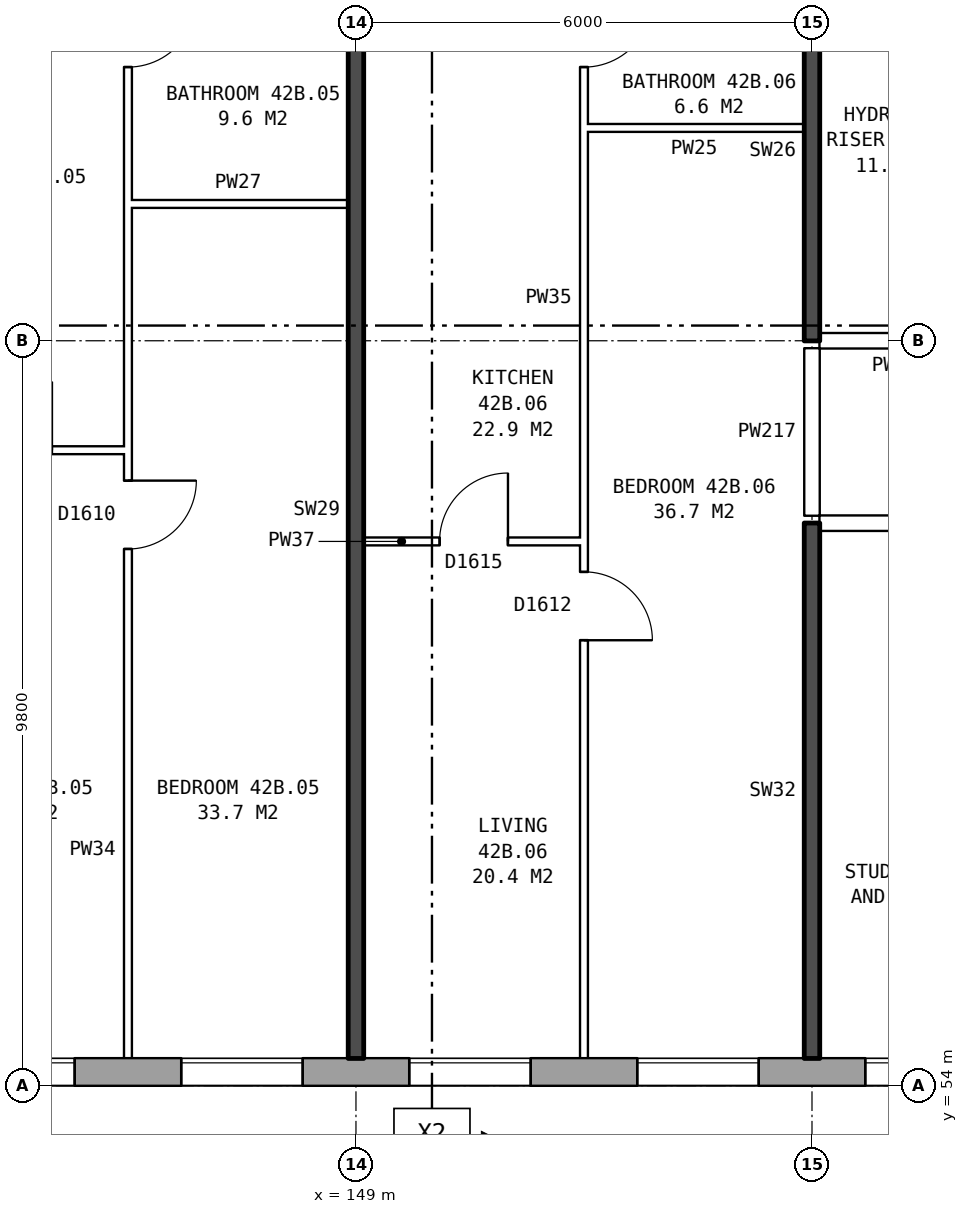
"""IFC4 building model, lengths in metres.
Left out: names, types, materials, properties, quantities, classifications, styles, units other than length and angle.
Written with IfcOpenShell. Run it as: python <this file> out.ifc"""

import sys

from ifc_helpers import new_model, si_unit, direction, frame, frame_2d, origin, place, context, subcontext, project, spatial, rectangle, extrude, element, fill, save


model = new_model("IFC4")
c1 = context("Model", 3, precision=1e-05, world=origin(), true_north=direction((0.0, 1.0)))
c2 = subcontext(c1, "Body", "Model", "MODEL_VIEW")
j1 = project(units=[si_unit("LENGTHUNIT", "METRE"), si_unit("PLANEANGLEUNIT", "RADIAN")], contexts=[c1])
p1 = place(None, origin())
s1 = spatial("IfcSite", under=j1, at=p1, CompositionType="ELEMENT")
p2 = place(p1, origin())
s2 = spatial("IfcBuilding", under=s1, at=p2, CompositionType="ELEMENT")
p3 = place(p2, frame((0.0, 0.0, 151.6)))
s3 = spatial("IfcBuildingStorey", under=s2, at=p3, CompositionType="ELEMENT", Elevation=151.6)
p4 = place(p3, frame((134.075, 54.18, 0.0), z_axis=(0.0, 0.0, 1.0), x_axis=(1.0, 0.0, 0.0)))
e1 = element("IfcWall", 1, at=p4, inside=s3, PredefinedType="STANDARD", context=c2, shape_type="SweptSolid", body=[
    extrude(rectangle(XDim=34.351, YDim=0.36, at=frame_2d((17.175, 0.0))), origin(), (0.0, 0.0, 1.0), 2.85),
])
p5 = place(p4, frame((0.3, 0.0, 0.8)))
e2 = element("IfcOpeningElement", 2, at=p5, cuts=e1, PredefinedType="OPENING", context=c2, shape_type="SweptSolid", body=[
    extrude(rectangle(XDim=0.8, YDim=1.8, at=frame_2d((0.4, 0.9))), frame((0.0, 0.19, 0.0), z_axis=(0.0, -1.0, 0.0), x_axis=(1.0, 0.0, 0.0)), (0.0, 0.0, 1.0), 0.38),
])
p6 = place(p4, frame((3.575, 0.0, 0.8)))
e3 = element("IfcOpeningElement", 3, at=p6, cuts=e1, PredefinedType="OPENING", context=c2, shape_type="SweptSolid", body=[
    extrude(rectangle(XDim=1.0, YDim=1.2, at=frame_2d((0.5, 0.6))), frame((0.0, 0.19, 0.0), z_axis=(0.0, -1.0, 0.0), x_axis=(1.0, 0.0, 0.0)), (0.0, 0.0, 1.0), 0.38),
])
p7 = place(p4, frame((6.625, 0.0, 0.8)))
e4 = element("IfcOpeningElement", 4, at=p7, cuts=e1, PredefinedType="OPENING", context=c2, shape_type="SweptSolid", body=[
    extrude(rectangle(XDim=1.6, YDim=1.8, at=frame_2d((0.8, 0.9))), frame((0.0, 0.19, 0.0), z_axis=(0.0, -1.0, 0.0), x_axis=(1.0, 0.0, 0.0)), (0.0, 0.0, 1.0), 0.38),
])
p8 = place(p4, frame((9.625, 0.0, 0.8)))
e5 = element("IfcOpeningElement", 5, at=p8, cuts=e1, PredefinedType="OPENING", context=c2, shape_type="SweptSolid", body=[
    extrude(rectangle(XDim=1.6, YDim=1.8, at=frame_2d((0.8, 0.9))), frame((0.0, 0.19, 0.0), z_axis=(0.0, -1.0, 0.0), x_axis=(1.0, 0.0, 0.0)), (0.0, 0.0, 1.0), 0.38),
])
p9 = place(p4, frame((12.625, 0.0, 0.8)))
e6 = element("IfcOpeningElement", 6, at=p9, cuts=e1, PredefinedType="OPENING", context=c2, shape_type="SweptSolid", body=[
    extrude(rectangle(XDim=1.6, YDim=1.8, at=frame_2d((0.8, 0.9))), frame((0.0, 0.19, 0.0), z_axis=(0.0, -1.0, 0.0), x_axis=(1.0, 0.0, 0.0)), (0.0, 0.0, 1.0), 0.38),
])
p10 = place(p4, frame((15.625, 0.0, 0.8)))
e7 = element("IfcOpeningElement", 7, at=p10, cuts=e1, PredefinedType="OPENING", context=c2, shape_type="SweptSolid", body=[
    extrude(rectangle(XDim=1.6, YDim=1.8, at=frame_2d((0.8, 0.9))), frame((0.0, 0.19, 0.0), z_axis=(0.0, -1.0, 0.0), x_axis=(1.0, 0.0, 0.0)), (0.0, 0.0, 1.0), 0.38),
])
p11 = place(p4, frame((18.625, 0.0, 0.8)))
e8 = element("IfcOpeningElement", 8, at=p11, cuts=e1, PredefinedType="OPENING", context=c2, shape_type="SweptSolid", body=[
    extrude(rectangle(XDim=1.6, YDim=1.8, at=frame_2d((0.8, 0.9))), frame((0.0, 0.19, 0.0), z_axis=(0.0, -1.0, 0.0), x_axis=(1.0, 0.0, 0.0)), (0.0, 0.0, 1.0), 0.38),
])
p12 = place(p4, frame((21.625, 0.0, 0.8)))
e9 = element("IfcOpeningElement", 9, at=p12, cuts=e1, PredefinedType="OPENING", context=c2, shape_type="SweptSolid", body=[
    extrude(rectangle(XDim=1.6, YDim=1.8, at=frame_2d((0.8, 0.9))), frame((0.0, 0.19, 0.0), z_axis=(0.0, -1.0, 0.0), x_axis=(1.0, 0.0, 0.0)), (0.0, 0.0, 1.0), 0.38),
])
p13 = place(p4, frame((24.625, 0.0, 0.8)))
e10 = element("IfcOpeningElement", 10, at=p13, cuts=e1, PredefinedType="OPENING", context=c2, shape_type="SweptSolid", body=[
    extrude(rectangle(XDim=1.6, YDim=1.8, at=frame_2d((0.8, 0.9))), frame((0.0, 0.19, 0.0), z_axis=(0.0, -1.0, 0.0), x_axis=(1.0, 0.0, 0.0)), (0.0, 0.0, 1.0), 0.38),
])
p14 = place(p4, frame((27.625, 0.0, 0.8)))
e11 = element("IfcOpeningElement", 11, at=p14, cuts=e1, PredefinedType="OPENING", context=c2, shape_type="SweptSolid", body=[
    extrude(rectangle(XDim=1.6, YDim=1.8, at=frame_2d((0.8, 0.9))), frame((0.0, 0.19, 0.0), z_axis=(0.0, -1.0, 0.0), x_axis=(1.0, 0.0, 0.0)), (0.0, 0.0, 1.0), 0.38),
])
p15 = place(p4, frame((29.525, 0.0, 0.8)))
e12 = element("IfcOpeningElement", 12, at=p15, cuts=e1, PredefinedType="OPENING", context=c2, shape_type="SweptSolid", body=[
    extrude(rectangle(XDim=0.6, YDim=1.8, at=frame_2d((0.3, 0.9))), frame((0.0, 0.19, 0.0), z_axis=(0.0, -1.0, 0.0), x_axis=(1.0, 0.0, 0.0)), (0.0, 0.0, 1.0), 0.38),
])
p16 = place(p4, frame((1.4, 0.0, 1.6)))
e13 = element("IfcOpeningElement", 13, at=p16, cuts=e1, PredefinedType="OPENING", context=c2, shape_type="SweptSolid", body=[
    extrude(rectangle(XDim=0.6, YDim=0.9, at=frame_2d((0.3, 0.45))), frame((0.0, 0.19, 0.0), z_axis=(0.0, -1.0, 0.0), x_axis=(1.0, 0.0, 0.0)), (0.0, 0.0, 1.0), 0.38),
])
p17 = place(p4, frame((4.875, 0.0, 0.8)))
e14 = element("IfcOpeningElement", 14, at=p17, cuts=e1, PredefinedType="OPENING", context=c2, shape_type="SweptSolid", body=[
    extrude(rectangle(XDim=1.4, YDim=1.8, at=frame_2d((0.7, 0.9))), frame((0.0, 0.19, 0.0), z_axis=(0.0, -1.0, 0.0), x_axis=(1.0, 0.0, 0.0)), (0.0, 0.0, 1.0), 0.38),
])
p18 = place(p4, frame((30.425, 0.0, 0.8)))
e15 = element("IfcOpeningElement", 15, at=p18, cuts=e1, PredefinedType="OPENING", context=c2, shape_type="SweptSolid", body=[
    extrude(rectangle(XDim=0.6, YDim=0.9, at=frame_2d((0.3, 0.45))), frame((0.0, 0.19, 0.0), z_axis=(0.0, -1.0, 0.0), x_axis=(1.0, 0.0, 0.0)), (0.0, 0.0, 1.0), 0.38),
])
p19 = place(p3, frame((149.1, 61.16, 0.0), z_axis=(0.0, 0.0, 1.0), x_axis=(1.0, 0.0, 0.0)))
e16 = element("IfcWall", 16, at=p19, inside=s3, PredefinedType="PARTITIONING", context=c2, shape_type="SweptSolid", body=[
    extrude(rectangle(XDim=2.9, YDim=0.1, at=frame_2d((1.45, 0.0))), origin(), (0.0, 0.0, 1.0), 2.85),
])
p20 = place(p19, frame((1.0, 0.0, 0.0)))
e17 = element("IfcOpeningElement", 17, at=p20, cuts=e16, PredefinedType="OPENING", context=c2, shape_type="SweptSolid", body=[
    extrude(rectangle(XDim=0.9, YDim=2.1, at=frame_2d((0.45, 1.05))), frame((0.0, 0.06, 0.0), z_axis=(0.0, -1.0, 0.0), x_axis=(1.0, 0.0, 0.0)), (0.0, 0.0, 1.0), 0.12),
])
p21 = place(p3, frame((155.1, 61.4, 0.0), z_axis=(0.0, 0.0, 1.0), x_axis=(1.0, 0.0, 0.0)))
e18 = element("IfcWall", 18, at=p21, inside=s3, PredefinedType="PARTITIONING", context=c2, shape_type="SweptSolid", body=[
    extrude(rectangle(XDim=16.04, YDim=0.2, at=frame_2d((8.02, 0.0))), origin(), (0.0, 0.0, 1.0), 2.85),
])
p22 = place(p21, frame((1.45, 0.0, 0.0)))
e19 = element("IfcOpeningElement", 19, at=p22, cuts=e18, PredefinedType="OPENING", context=c2, shape_type="SweptSolid", body=[
    extrude(rectangle(XDim=1.0, YDim=2.1, at=frame_2d((0.5, 1.05))), frame((0.0, 0.11, 0.0), z_axis=(0.0, -1.0, 0.0), x_axis=(1.0, 0.0, 0.0)), (0.0, 0.0, 1.0), 0.22),
])
p23 = place(p21, frame((8.4, 0.0, 0.0)))
e20 = element("IfcOpeningElement", 20, at=p23, cuts=e18, PredefinedType="OPENING", context=c2, shape_type="SweptSolid", body=[
    extrude(rectangle(XDim=1.0, YDim=2.1, at=frame_2d((0.5, 1.05))), frame((0.0, 0.11, 0.0), z_axis=(0.0, -1.0, 0.0), x_axis=(1.0, 0.0, 0.0)), (0.0, 0.0, 1.0), 0.22),
])
p24 = place(p3, frame((143.1, 62.36, 0.0), z_axis=(0.0, 0.0, 1.0), x_axis=(1.0, 0.0, 0.0)))
e21 = element("IfcWall", 21, at=p24, inside=s3, PredefinedType="PARTITIONING", context=c2, shape_type="SweptSolid", body=[
    extrude(rectangle(XDim=2.9, YDim=0.1, at=frame_2d((1.45, 0.0))), origin(), (0.0, 0.0, 1.0), 2.85),
])
p25 = place(p24, frame((1.0, 0.0, 0.0)))
e22 = element("IfcOpeningElement", 22, at=p25, cuts=e21, PredefinedType="OPENING", context=c2, shape_type="SweptSolid", body=[
    extrude(rectangle(XDim=0.9, YDim=2.1, at=frame_2d((0.45, 1.05))), frame((0.0, 0.06, 0.0), z_axis=(0.0, -1.0, 0.0), x_axis=(1.0, 0.0, 0.0)), (0.0, 0.0, 1.0), 0.12),
])
p26 = place(p3, frame((155.1, 63.8, 0.0), z_axis=(0.0, 0.0, 1.0), x_axis=(1.0, 0.0, 0.0)))
e23 = element("IfcWall", 23, at=p26, inside=s3, PredefinedType="PARTITIONING", context=c2, shape_type="SweptSolid", body=[
    extrude(rectangle(XDim=2.14, YDim=0.2, at=frame_2d((1.07, 0.0))), origin(), (0.0, 0.0, 1.0), 2.85),
])
for number, where, z_axis, x_axis in (
    (24, (146.0, 65.6, 0.0), (0.0, 0.0, 1.0), (1.0, 0.0, 0.0)),
    (25, (152.0, 66.6, 0.0), (0.0, 0.0, 1.0), (1.0, 0.0, 0.0)),
):
    element("IfcWall", number, at=place(p3, frame(where, z_axis=z_axis, x_axis=x_axis)), inside=s3, PredefinedType="PARTITIONING", context=c2, shape_type="SweptSolid", body=[
        extrude(rectangle(XDim=2.9, YDim=0.1, at=frame_2d((1.45, 0.0))), origin(), (0.0, 0.0, 1.0), 2.85),
    ])
p27 = place(p3, frame((146.0, 54.36, 0.0), z_axis=(0.0, 0.0, 1.0), x_axis=(0.0, 1.0, 0.0)))
e26 = element("IfcWall", 26, at=p27, inside=s3, PredefinedType="PARTITIONING", context=c2, shape_type="SweptSolid", body=[
    extrude(rectangle(XDim=14.34, YDim=0.1, at=frame_2d((7.17, 0.0))), origin(), (0.0, 0.0, 1.0), 2.85),
])
p28 = place(p27, frame((6.7, 0.0, 0.0)))
e27 = element("IfcOpeningElement", 27, at=p28, cuts=e26, PredefinedType="OPENING", context=c2, shape_type="SweptSolid", body=[
    extrude(rectangle(XDim=0.9, YDim=2.1, at=frame_2d((0.45, 1.05))), frame((0.0, 0.06, 0.0), z_axis=(0.0, -1.0, 0.0), x_axis=(1.0, 0.0, 0.0)), (0.0, 0.0, 1.0), 0.12),
])
p29 = place(p27, frame((13.04, 0.0, 0.0)))
e28 = element("IfcOpeningElement", 28, at=p29, cuts=e26, PredefinedType="OPENING", context=c2, shape_type="SweptSolid", body=[
    extrude(rectangle(XDim=0.9, YDim=2.1, at=frame_2d((0.45, 1.05))), frame((0.0, 0.06, 0.0), z_axis=(0.0, -1.0, 0.0), x_axis=(1.0, 0.0, 0.0)), (0.0, 0.0, 1.0), 0.12),
])
p30 = place(p3, frame((149.0, 54.36, 0.0), z_axis=(0.0, 0.0, 1.0), x_axis=(0.0, 1.0, 0.0)))
e29 = element("IfcWall", 29, at=p30, inside=s3, PredefinedType="SOLIDWALL", context=c2, shape_type="SweptSolid", body=[
    extrude(rectangle(XDim=14.44, YDim=0.2, at=frame_2d((7.22, 0.0))), origin(), (0.0, 0.0, 1.0), 2.85),
])
p31 = place(p3, frame((152.0, 54.36, 0.0), z_axis=(0.0, 0.0, 1.0), x_axis=(0.0, 1.0, 0.0)))
e30 = element("IfcWall", 30, at=p31, inside=s3, PredefinedType="PARTITIONING", context=c2, shape_type="SweptSolid", body=[
    extrude(rectangle(XDim=14.34, YDim=0.1, at=frame_2d((7.17, 0.0))), origin(), (0.0, 0.0, 1.0), 2.85),
])
p32 = place(p31, frame((5.5, 0.0, 0.0)))
e31 = element("IfcOpeningElement", 31, at=p32, cuts=e30, PredefinedType="OPENING", context=c2, shape_type="SweptSolid", body=[
    extrude(rectangle(XDim=0.9, YDim=2.1, at=frame_2d((0.45, 1.05))), frame((0.0, 0.06, 0.0), z_axis=(0.0, -1.0, 0.0), x_axis=(1.0, 0.0, 0.0)), (0.0, 0.0, 1.0), 0.12),
])
p33 = place(p31, frame((13.04, 0.0, 0.0)))
e32 = element("IfcOpeningElement", 32, at=p33, cuts=e30, PredefinedType="OPENING", context=c2, shape_type="SweptSolid", body=[
    extrude(rectangle(XDim=0.9, YDim=2.1, at=frame_2d((0.45, 1.05))), frame((0.0, 0.06, 0.0), z_axis=(0.0, -1.0, 0.0), x_axis=(1.0, 0.0, 0.0)), (0.0, 0.0, 1.0), 0.12),
])
p34 = place(p3, frame((155.0, 54.36, 0.0), z_axis=(0.0, 0.0, 1.0), x_axis=(0.0, 1.0, 0.0)))
e33 = element("IfcWall", 33, at=p34, inside=s3, PredefinedType="SOLIDWALL", context=c2, shape_type="SweptSolid", body=[
    extrude(rectangle(XDim=7.04, YDim=0.2, at=frame_2d((3.52, 0.0))), origin(), (0.0, 0.0, 1.0), 2.85),
])
p35 = place(p3, frame((155.0, 61.5, 0.0), z_axis=(0.0, 0.0, 1.0), x_axis=(0.0, 1.0, 0.0)))
e34 = element("IfcWall", 34, at=p35, inside=s3, PredefinedType="PARTITIONING", context=c2, shape_type="SweptSolid", body=[
    extrude(rectangle(XDim=2.2, YDim=0.2, at=frame_2d((1.1, 0.0))), origin(), (0.0, 0.0, 1.0), 2.85),
])
p36 = place(p3, frame((155.0, 63.8, 0.0), z_axis=(0.0, 0.0, 1.0), x_axis=(0.0, 1.0, 0.0)))
e35 = element("IfcWall", 35, at=p36, inside=s3, PredefinedType="SOLIDWALL", context=c2, shape_type="SweptSolid", body=[
    extrude(rectangle(XDim=5.0, YDim=0.2, at=frame_2d((2.5, 0.0))), origin(), (0.0, 0.0, 1.0), 2.85),
])
p37 = place(p8, origin())
e36 = element("IfcWindow", 36, at=p37, inside=s3, PartitioningType="SINGLE_PANEL", PredefinedType="WINDOW", context=c2, shape_type="SweptSolid", body=[
    extrude(rectangle(XDim=1.6, YDim=1.8, at=frame_2d((0.8, 0.9))), frame((0.0, 0.15, 0.0), z_axis=(0.0, -1.0, 0.0), x_axis=(1.0, 0.0, 0.0)), (0.0, 0.0, 1.0), 0.06),
])
fill(e5, e36)
p38 = place(p9, origin())
e37 = element("IfcWindow", 37, at=p38, inside=s3, PartitioningType="SINGLE_PANEL", PredefinedType="WINDOW", context=c2, shape_type="SweptSolid", body=[
    extrude(rectangle(XDim=1.6, YDim=1.8, at=frame_2d((0.8, 0.9))), frame((0.0, 0.15, 0.0), z_axis=(0.0, -1.0, 0.0), x_axis=(1.0, 0.0, 0.0)), (0.0, 0.0, 1.0), 0.06),
])
fill(e6, e37)
p39 = place(p10, origin())
e38 = element("IfcWindow", 38, at=p39, inside=s3, PartitioningType="SINGLE_PANEL", PredefinedType="WINDOW", context=c2, shape_type="SweptSolid", body=[
    extrude(rectangle(XDim=1.6, YDim=1.8, at=frame_2d((0.8, 0.9))), frame((0.0, 0.15, 0.0), z_axis=(0.0, -1.0, 0.0), x_axis=(1.0, 0.0, 0.0)), (0.0, 0.0, 1.0), 0.06),
])
fill(e7, e38)
p40 = place(p11, origin())
e39 = element("IfcWindow", 39, at=p40, inside=s3, PartitioningType="SINGLE_PANEL", PredefinedType="WINDOW", context=c2, shape_type="SweptSolid", body=[
    extrude(rectangle(XDim=1.6, YDim=1.8, at=frame_2d((0.8, 0.9))), frame((0.0, 0.15, 0.0), z_axis=(0.0, -1.0, 0.0), x_axis=(1.0, 0.0, 0.0)), (0.0, 0.0, 1.0), 0.06),
])
fill(e8, e39)
p41 = place(p12, origin())
e40 = element("IfcWindow", 40, at=p41, inside=s3, PartitioningType="SINGLE_PANEL", PredefinedType="WINDOW", context=c2, shape_type="SweptSolid", body=[
    extrude(rectangle(XDim=1.6, YDim=1.8, at=frame_2d((0.8, 0.9))), frame((0.0, 0.15, 0.0), z_axis=(0.0, -1.0, 0.0), x_axis=(1.0, 0.0, 0.0)), (0.0, 0.0, 1.0), 0.06),
])
fill(e9, e40)
p42 = place(p28, frame((0.9, 0.0, 0.0), z_axis=(0.0, 0.0, 1.0), x_axis=(-1.0, 0.0, 0.0)))
e41 = element("IfcDoor", 41, at=p42, inside=s3, OperationType="SINGLE_SWING_LEFT", PredefinedType="DOOR", context=c2, shape_type="SweptSolid", body=[
    extrude(rectangle(XDim=0.9, YDim=2.1, at=frame_2d((0.45, 1.05))), frame((0.0, 0.025, 0.0), z_axis=(0.0, -1.0, 0.0), x_axis=(1.0, 0.0, 0.0)), (0.0, 0.0, 1.0), 0.05),
])
fill(e27, e41)
p43 = place(p29, frame((0.9, 0.0, 0.0), z_axis=(0.0, 0.0, 1.0), x_axis=(-1.0, 0.0, 0.0)))
e42 = element("IfcDoor", 42, at=p43, inside=s3, OperationType="SINGLE_SWING_LEFT", PredefinedType="DOOR", context=c2, shape_type="SweptSolid", body=[
    extrude(rectangle(XDim=0.9, YDim=2.1, at=frame_2d((0.45, 1.05))), frame((0.0, 0.025, 0.0), z_axis=(0.0, -1.0, 0.0), x_axis=(1.0, 0.0, 0.0)), (0.0, 0.0, 1.0), 0.05),
])
fill(e28, e42)
p44 = place(p32, frame((0.9, 0.0, 0.0), z_axis=(0.0, 0.0, 1.0), x_axis=(-1.0, 0.0, 0.0)))
e43 = element("IfcDoor", 43, at=p44, inside=s3, OperationType="SINGLE_SWING_RIGHT", PredefinedType="DOOR", context=c2, shape_type="SweptSolid", body=[
    extrude(rectangle(XDim=0.9, YDim=2.1, at=frame_2d((0.45, 1.05))), frame((0.0, 0.025, 0.0), z_axis=(0.0, -1.0, 0.0), x_axis=(1.0, 0.0, 0.0)), (0.0, 0.0, 1.0), 0.05),
])
fill(e31, e43)
p45 = place(p20, origin())
e44 = element("IfcDoor", 44, at=p45, inside=s3, OperationType="SINGLE_SWING_RIGHT", PredefinedType="DOOR", context=c2, shape_type="SweptSolid", body=[
    extrude(rectangle(XDim=0.9, YDim=2.1, at=frame_2d((0.45, 1.05))), frame((0.0, 0.025, 0.0), z_axis=(0.0, -1.0, 0.0), x_axis=(1.0, 0.0, 0.0)), (0.0, 0.0, 1.0), 0.05),
])
fill(e17, e44)
p46 = place(p33, frame((0.9, 0.0, 0.0), z_axis=(0.0, 0.0, 1.0), x_axis=(-1.0, 0.0, 0.0)))
e45 = element("IfcDoor", 45, at=p46, inside=s3, OperationType="SINGLE_SWING_LEFT", PredefinedType="DOOR", context=c2, shape_type="SweptSolid", body=[
    extrude(rectangle(XDim=0.9, YDim=2.1, at=frame_2d((0.45, 1.05))), frame((0.0, 0.025, 0.0), z_axis=(0.0, -1.0, 0.0), x_axis=(1.0, 0.0, 0.0)), (0.0, 0.0, 1.0), 0.05),
])
fill(e32, e45)
save(model, sys.argv[1])
